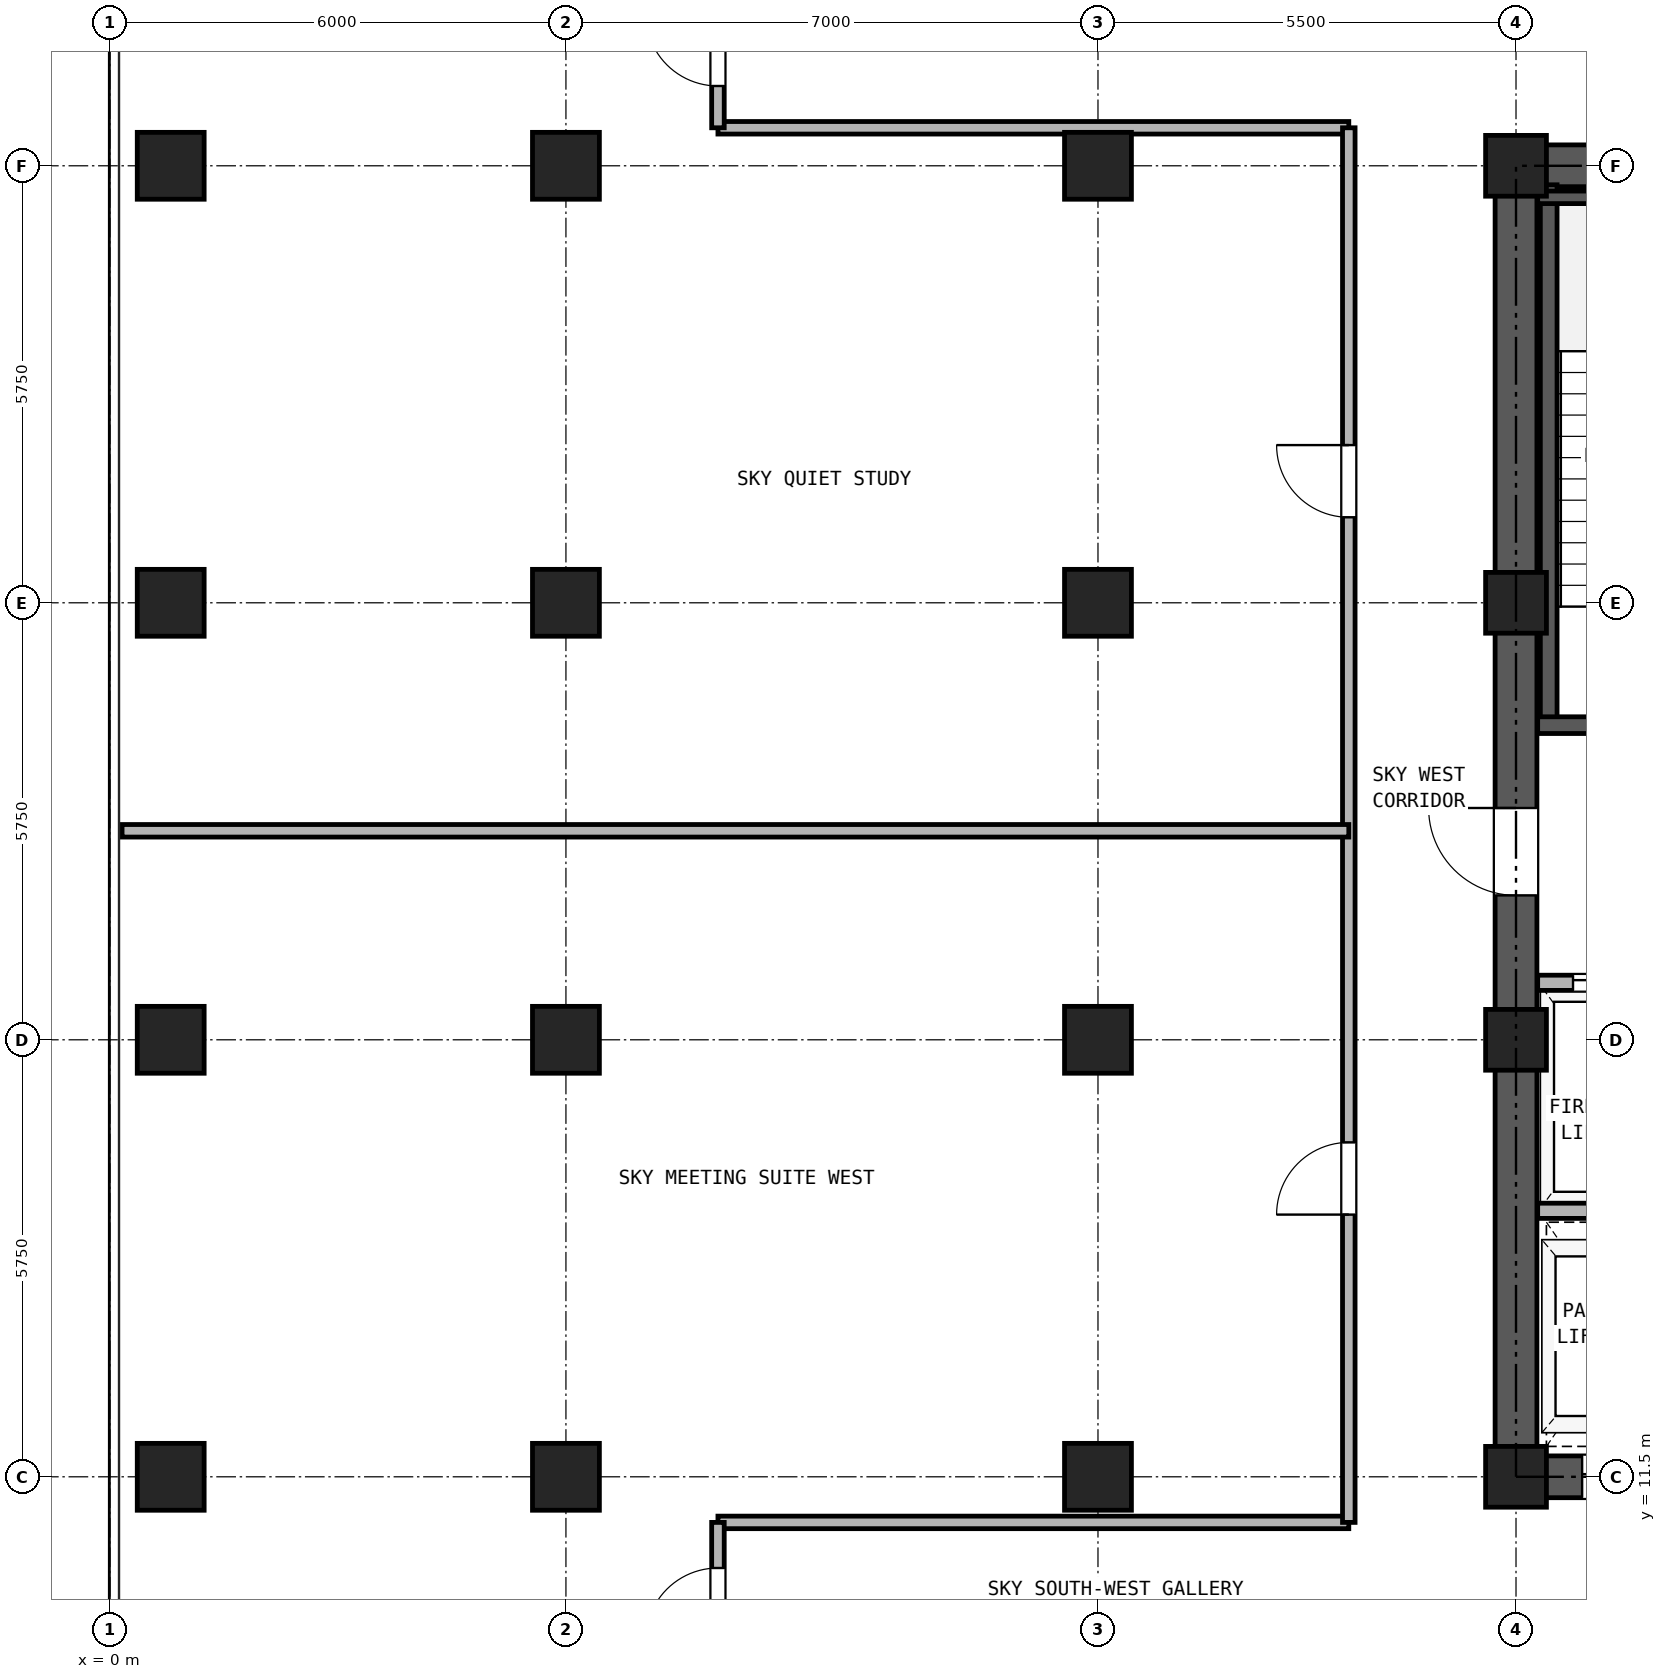
"""IFC4 building model, lengths in metres.
Left out: names, types, materials, properties, quantities, classifications, styles, units other than length and angle.
Written with IfcOpenShell. Run it as: python <this file> out.ifc"""

import sys

from ifc_helpers import new_model, si_unit, direction, frame, frame_2d, origin, origin_2d, place, context, subcontext, project, spatial, rectangle, hollow_rectangle, extrude, source, transform, mapped, element, fill, save


model = new_model("IFC4")
c1 = context("Model", 3, precision=1e-05, world=origin(), true_north=direction((0.0, 1.0)))
c2 = subcontext(c1, "Body", "Model", "MODEL_VIEW")
j1 = project(units=[si_unit("LENGTHUNIT", "METRE"), si_unit("PLANEANGLEUNIT", "RADIAN")], contexts=[c1])
p1 = place(None, origin())
s1 = spatial("IfcSite", under=j1, at=p1, CompositionType="ELEMENT")
p2 = place(p1, origin())
s2 = spatial("IfcBuilding", under=s1, at=p2, CompositionType="ELEMENT")
p3 = place(p2, frame((0.0, 0.0, 88.2)))
s3 = spatial("IfcBuildingStorey", under=s2, at=p3, CompositionType="ELEMENT", Elevation=88.2)
m1 = source(origin(), c2, "Body", "SweptSolid", [
    extrude(hollow_rectangle(XDim=0.88, YDim=0.88, WallThickness=0.05, at=origin_2d()), origin(), (0.0, 0.0, 1.0), 4.25),
])
for number, where, z_axis, x_axis in (
    (1, (0.8, 11.5, 0.0), (0.0, 0.0, 1.0), (1.0, 0.0, 0.0)),
    (2, (0.8, 17.25, 0.0), (0.0, 0.0, 1.0), (1.0, 0.0, 0.0)),
    (3, (0.8, 23.0, 0.0), (0.0, 0.0, 1.0), (1.0, 0.0, 0.0)),
    (4, (0.8, 28.75, 0.0), (0.0, 0.0, 1.0), (1.0, 0.0, 0.0)),
    (5, (6.0, 11.5, 0.0), (0.0, 0.0, 1.0), (1.0, 0.0, 0.0)),
    (6, (6.0, 17.25, 0.0), (0.0, 0.0, 1.0), (1.0, 0.0, 0.0)),
    (7, (6.0, 23.0, 0.0), (0.0, 0.0, 1.0), (1.0, 0.0, 0.0)),
    (8, (6.0, 28.75, 0.0), (0.0, 0.0, 1.0), (1.0, 0.0, 0.0)),
    (9, (13.0, 11.5, 0.0), (0.0, 0.0, 1.0), (1.0, 0.0, 0.0)),
    (10, (13.0, 17.25, 0.0), (0.0, 0.0, 1.0), (1.0, 0.0, 0.0)),
    (11, (13.0, 23.0, 0.0), (0.0, 0.0, 1.0), (1.0, 0.0, 0.0)),
    (12, (13.0, 28.75, 0.0), (0.0, 0.0, 1.0), (1.0, 0.0, 0.0)),
):
    element("IfcColumn", number, at=place(p3, frame(where, z_axis=z_axis, x_axis=x_axis)), inside=s3, PredefinedType="COLUMN", context=c2, shape_type="MappedRepresentation", body=[
        mapped(m1, transform((0.0, 0.0, 0.0), x_axis=(1.0, 0.0, 0.0), y_axis=(0.0, 1.0, 0.0), z_axis=(0.0, 0.0, 1.0), scale=1.0)),
    ])
m2 = source(origin(), c2, "Body", "SweptSolid", [
    extrude(hollow_rectangle(XDim=0.8, YDim=0.8, WallThickness=0.045, at=origin_2d()), origin(), (0.0, 0.0, 1.0), 4.25),
])
for number, where, z_axis, x_axis in (
    (13, (18.5, 11.5, 0.0), (0.0, 0.0, 1.0), (1.0, 0.0, 0.0)),
    (14, (18.5, 17.25, 0.0), (0.0, 0.0, 1.0), (1.0, 0.0, 0.0)),
    (15, (18.5, 23.0, 0.0), (0.0, 0.0, 1.0), (1.0, 0.0, 0.0)),
    (16, (18.5, 28.75, 0.0), (0.0, 0.0, 1.0), (1.0, 0.0, 0.0)),
):
    element("IfcColumn", number, at=place(p3, frame(where, z_axis=z_axis, x_axis=x_axis)), inside=s3, PredefinedType="COLUMN", context=c2, shape_type="MappedRepresentation", body=[
        mapped(m2, transform((0.0, 0.0, 0.0), x_axis=(1.0, 0.0, 0.0), y_axis=(0.0, 1.0, 0.0), z_axis=(0.0, 0.0, 1.0), scale=1.0)),
    ])
p4 = place(p3, frame((18.225, 11.5, 0.0), z_axis=(0.0, 0.0, 1.0), x_axis=(1.0, 0.0, 0.0)))
e17 = element("IfcWall", 17, at=p4, inside=s3, PredefinedType="SHEAR", context=c2, shape_type="SweptSolid", body=[
    extrude(rectangle(XDim=10.55, YDim=0.55, at=frame_2d((5.275, 0.0))), origin(), (0.0, 0.0, 1.0), 4.25),
])
p5 = place(p4, frame((1.145, 0.0, 0.0)))
e18 = element("IfcOpeningElement", 18, at=p5, cuts=e17, PredefinedType="OPENING", context=c2, shape_type="SweptSolid", body=[
    extrude(rectangle(XDim=1.1, YDim=2.25, at=frame_2d((0.55, 1.125))), frame((0.0, 0.285, 0.0), z_axis=(0.0, -1.0, 0.0), x_axis=(1.0, 0.0, 0.0)), (0.0, 0.0, 1.0), 0.57),
])
p6 = place(p4, frame((3.445, 0.0, 0.0)))
e19 = element("IfcOpeningElement", 19, at=p6, cuts=e17, PredefinedType="OPENING", context=c2, shape_type="SweptSolid", body=[
    extrude(rectangle(XDim=1.1, YDim=2.25, at=frame_2d((0.55, 1.125))), frame((0.0, 0.285, 0.0), z_axis=(0.0, -1.0, 0.0), x_axis=(1.0, 0.0, 0.0)), (0.0, 0.0, 1.0), 0.57),
])
p7 = place(p4, frame((5.875, 0.0, 0.0)))
e20 = element("IfcOpeningElement", 20, at=p7, cuts=e17, PredefinedType="OPENING", context=c2, shape_type="SweptSolid", body=[
    extrude(rectangle(XDim=1.1, YDim=2.25, at=frame_2d((0.55, 1.125))), frame((0.0, 0.285, 0.0), z_axis=(0.0, -1.0, 0.0), x_axis=(1.0, 0.0, 0.0)), (0.0, 0.0, 1.0), 0.57),
])
p8 = place(p4, frame((8.275, 0.0, 0.0)))
e21 = element("IfcOpeningElement", 21, at=p8, cuts=e17, PredefinedType="OPENING", context=c2, shape_type="SweptSolid", body=[
    extrude(rectangle(XDim=1.1, YDim=2.25, at=frame_2d((0.55, 1.125))), frame((0.0, 0.285, 0.0), z_axis=(0.0, -1.0, 0.0), x_axis=(1.0, 0.0, 0.0)), (0.0, 0.0, 1.0), 0.57),
])
p9 = place(p3, frame((18.225, 28.75, 0.0), z_axis=(0.0, 0.0, 1.0), x_axis=(1.0, 0.0, 0.0)))
e22 = element("IfcWall", 22, at=p9, inside=s3, PredefinedType="SHEAR", context=c2, shape_type="SweptSolid", body=[
    extrude(rectangle(XDim=10.55, YDim=0.55, at=frame_2d((5.275, 0.0))), origin(), (0.0, 0.0, 1.0), 4.25),
])
p10 = place(p9, frame((4.155, 0.0, 0.0)))
e23 = element("IfcOpeningElement", 23, at=p10, cuts=e22, PredefinedType="OPENING", context=c2, shape_type="SweptSolid", body=[
    extrude(rectangle(XDim=0.9, YDim=2.05, at=frame_2d((0.45, 1.025))), frame((0.0, 0.285, 0.0), z_axis=(0.0, -1.0, 0.0), x_axis=(1.0, 0.0, 0.0)), (0.0, 0.0, 1.0), 0.57),
])
p11 = place(p9, frame((5.695, 0.0, 0.0)))
e24 = element("IfcOpeningElement", 24, at=p11, cuts=e22, PredefinedType="OPENING", context=c2, shape_type="SweptSolid", body=[
    extrude(rectangle(XDim=0.9, YDim=2.05, at=frame_2d((0.45, 1.025))), frame((0.0, 0.285, 0.0), z_axis=(0.0, -1.0, 0.0), x_axis=(1.0, 0.0, 0.0)), (0.0, 0.0, 1.0), 0.57),
])
p12 = place(p3, frame((18.5, 11.775, 0.0), z_axis=(0.0, 0.0, 1.0), x_axis=(0.0, 1.0, 0.0)))
e25 = element("IfcWall", 25, at=p12, inside=s3, PredefinedType="SHEAR", context=c2, shape_type="SweptSolid", body=[
    extrude(rectangle(XDim=16.7, YDim=0.55, at=frame_2d((8.35, 0.0))), origin(), (0.0, 0.0, 1.0), 4.25),
])
p13 = place(p12, frame((7.375, 0.0, 0.0)))
e26 = element("IfcOpeningElement", 26, at=p13, cuts=e25, PredefinedType="OPENING", context=c2, shape_type="SweptSolid", body=[
    extrude(rectangle(XDim=1.15, YDim=2.2, at=frame_2d((0.575, 1.1))), frame((0.0, 0.285, 0.0), z_axis=(0.0, -1.0, 0.0), x_axis=(1.0, 0.0, 0.0)), (0.0, 0.0, 1.0), 0.57),
])
p14 = place(p3, frame((18.93, 21.39, 0.0), z_axis=(0.0, 0.0, 1.0), x_axis=(0.0, 1.0, 0.0)))
e27 = element("IfcWall", 27, at=p14, inside=s3, PredefinedType="SOLIDWALL", context=c2, shape_type="SweptSolid", body=[
    extrude(rectangle(XDim=7.11, YDim=0.22, at=frame_2d((3.555, 0.0))), origin(), (0.0, 0.0, 1.0), 4.25),
])
p15 = place(p3, frame((18.785, 28.335, 0.0), z_axis=(0.0, 0.0, 1.0), x_axis=(1.0, 0.0, 0.0)))
e28 = element("IfcWall", 28, at=p15, inside=s3, PredefinedType="PARTITIONING", context=c2, shape_type="SweptSolid", body=[
    extrude(rectangle(XDim=3.325, YDim=0.165, at=frame_2d((1.663, 0.0))), origin(), (0.0, 0.0, 1.0), 4.25),
])
p16 = place(p3, frame((18.785, 21.39, 0.0), z_axis=(0.0, 0.0, 1.0), x_axis=(1.0, 0.0, 0.0)))
e29 = element("IfcWall", 29, at=p16, inside=s3, PredefinedType="SOLIDWALL", context=c2, shape_type="SweptSolid", body=[
    extrude(rectangle(XDim=6.345, YDim=0.22, at=frame_2d((3.172, 0.0))), origin(), (0.0, 0.0, 1.0), 4.25),
])
p17 = place(p16, frame((1.065, 0.0, 0.0)))
e30 = element("IfcOpeningElement", 30, at=p17, cuts=e29, PredefinedType="OPENING", context=c2, shape_type="SweptSolid", body=[
    extrude(rectangle(XDim=1.15, YDim=2.2, at=frame_2d((0.575, 1.1))), frame((0.0, 0.12, 0.0), z_axis=(0.0, -1.0, 0.0), x_axis=(1.0, 0.0, 0.0)), (0.0, 0.0, 1.0), 0.24),
])
p18 = place(p16, frame((4.795, 0.0, 0.0)))
e31 = element("IfcOpeningElement", 31, at=p18, cuts=e29, PredefinedType="OPENING", context=c2, shape_type="SweptSolid", body=[
    extrude(rectangle(XDim=1.1, YDim=2.25, at=frame_2d((0.55, 1.125))), frame((0.0, 0.12, 0.0), z_axis=(0.0, -1.0, 0.0), x_axis=(1.0, 0.0, 0.0)), (0.0, 0.0, 1.0), 0.24),
])
p19 = place(p3, frame((18.785, 18.0, 0.0), z_axis=(0.0, 0.0, 1.0), x_axis=(1.0, 0.0, 0.0)))
e32 = element("IfcWall", 32, at=p19, inside=s3, PredefinedType="PARTITIONING", context=c2, shape_type="SweptSolid", body=[
    extrude(rectangle(XDim=9.43, YDim=0.2, at=frame_2d((4.715, 0.0))), origin(), (0.0, 0.0, 1.0), 4.25),
])
p20 = place(p19, frame((0.465, 0.0, 0.0)))
e33 = element("IfcOpeningElement", 33, at=p20, cuts=e32, PredefinedType="OPENING", context=c2, shape_type="SweptSolid", body=[
    extrude(rectangle(XDim=1.3, YDim=2.3, at=frame_2d((0.65, 1.15))), frame((0.0, 0.11, 0.0), z_axis=(0.0, -1.0, 0.0), x_axis=(1.0, 0.0, 0.0)), (0.0, 0.0, 1.0), 0.22),
])
p21 = place(p19, frame((2.565, 0.0, 0.0)))
e34 = element("IfcOpeningElement", 34, at=p21, cuts=e32, PredefinedType="OPENING", context=c2, shape_type="SweptSolid", body=[
    extrude(rectangle(XDim=1.3, YDim=2.3, at=frame_2d((0.65, 1.15))), frame((0.0, 0.11, 0.0), z_axis=(0.0, -1.0, 0.0), x_axis=(1.0, 0.0, 0.0)), (0.0, 0.0, 1.0), 0.22),
])
p22 = place(p19, frame((7.065, 0.0, 0.0)))
e35 = element("IfcOpeningElement", 35, at=p22, cuts=e32, PredefinedType="OPENING", context=c2, shape_type="SweptSolid", body=[
    extrude(rectangle(XDim=1.0, YDim=2.15, at=frame_2d((0.5, 1.075))), frame((0.0, 0.11, 0.0), z_axis=(0.0, -1.0, 0.0), x_axis=(1.0, 0.0, 0.0)), (0.0, 0.0, 1.0), 0.22),
])
p23 = place(p3, frame((18.785, 15.0, 0.0), z_axis=(0.0, 0.0, 1.0), x_axis=(1.0, 0.0, 0.0)))
e36 = element("IfcWall", 36, at=p23, inside=s3, PredefinedType="PARTITIONING", context=c2, shape_type="SweptSolid", body=[
    extrude(rectangle(XDim=9.43, YDim=0.2, at=frame_2d((4.715, 0.0))), origin(), (0.0, 0.0, 1.0), 4.25),
])
for number, where, z_axis, x_axis in (
    (37, (8.0, 10.9, 0.0), (0.0, 0.0, 1.0), (1.0, 0.0, 0.0)),
    (38, (8.0, 29.25, 0.0), (0.0, 0.0, 1.0), (1.0, 0.0, 0.0)),
):
    element("IfcWall", number, at=place(p3, frame(where, z_axis=z_axis, x_axis=x_axis)), inside=s3, PredefinedType="PARTITIONING", context=c2, shape_type="SweptSolid", body=[
        extrude(rectangle(XDim=8.3, YDim=0.165, at=frame_2d((4.15, 0.0))), origin(), (0.0, 0.0, 1.0), 4.25),
    ])
p24 = place(p3, frame((16.3, 10.9, 0.0), z_axis=(0.0, 0.0, 1.0), x_axis=(0.0, 1.0, 0.0)))
e39 = element("IfcWall", 39, at=p24, inside=s3, PredefinedType="PARTITIONING", context=c2, shape_type="SweptSolid", body=[
    extrude(rectangle(XDim=18.35, YDim=0.165, at=frame_2d((9.175, 0.0))), origin(), (0.0, 0.0, 1.0), 4.25),
])
p25 = place(p24, frame((4.05, 0.0, 0.0)))
e40 = element("IfcOpeningElement", 40, at=p25, cuts=e39, PredefinedType="OPENING", context=c2, shape_type="SweptSolid", body=[
    extrude(rectangle(XDim=0.95, YDim=2.15, at=frame_2d((0.475, 1.075))), frame((0.0, 0.093, 0.0), z_axis=(0.0, -1.0, 0.0), x_axis=(1.0, 0.0, 0.0)), (0.0, 0.0, 1.0), 0.185),
])
p26 = place(p24, frame((13.225, 0.0, 0.0)))
e41 = element("IfcOpeningElement", 41, at=p26, cuts=e39, PredefinedType="OPENING", context=c2, shape_type="SweptSolid", body=[
    extrude(rectangle(XDim=0.95, YDim=2.15, at=frame_2d((0.475, 1.075))), frame((0.0, 0.093, 0.0), z_axis=(0.0, -1.0, 0.0), x_axis=(1.0, 0.0, 0.0)), (0.0, 0.0, 1.0), 0.185),
])
p27 = place(p3, frame((8.0, 0.16, 0.0), z_axis=(0.0, 0.0, 1.0), x_axis=(0.0, 1.0, 0.0)))
e42 = element("IfcWall", 42, at=p27, inside=s3, PredefinedType="PARTITIONING", context=c2, shape_type="SweptSolid", body=[
    extrude(rectangle(XDim=10.74, YDim=0.165, at=frame_2d((5.37, 0.0))), origin(), (0.0, 0.0, 1.0), 4.25),
])
p28 = place(p27, frame((9.19, 0.0, 0.0)))
e43 = element("IfcOpeningElement", 43, at=p28, cuts=e42, PredefinedType="OPENING", context=c2, shape_type="SweptSolid", body=[
    extrude(rectangle(XDim=0.95, YDim=2.15, at=frame_2d((0.475, 1.075))), frame((0.0, 0.093, 0.0), z_axis=(0.0, -1.0, 0.0), x_axis=(1.0, 0.0, 0.0)), (0.0, 0.0, 1.0), 0.185),
])
p29 = place(p3, frame((8.0, 29.25, 0.0), z_axis=(0.0, 0.0, 1.0), x_axis=(0.0, 1.0, 0.0)))
e44 = element("IfcWall", 44, at=p29, inside=s3, PredefinedType="PARTITIONING", context=c2, shape_type="SweptSolid", body=[
    extrude(rectangle(XDim=5.89, YDim=0.165, at=frame_2d((2.945, 0.0))), origin(), (0.0, 0.0, 1.0), 4.25),
])
p30 = place(p29, frame((0.55, 0.0, 0.0)))
e45 = element("IfcOpeningElement", 45, at=p30, cuts=e44, PredefinedType="OPENING", context=c2, shape_type="SweptSolid", body=[
    extrude(rectangle(XDim=0.95, YDim=2.15, at=frame_2d((0.475, 1.075))), frame((0.0, 0.093, 0.0), z_axis=(0.0, -1.0, 0.0), x_axis=(1.0, 0.0, 0.0)), (0.0, 0.0, 1.0), 0.185),
])
p31 = place(p3, frame((0.16, 20.0, 0.0), z_axis=(0.0, 0.0, 1.0), x_axis=(1.0, 0.0, 0.0)))
e46 = element("IfcWall", 46, at=p31, inside=s3, PredefinedType="PARTITIONING", context=c2, shape_type="SweptSolid", body=[
    extrude(rectangle(XDim=16.14, YDim=0.165, at=frame_2d((8.07, 0.0))), origin(), (0.0, 0.0, 1.0), 3.883),
])
p32 = place(p20, origin())
e47 = element("IfcDoor", 47, at=p32, inside=s3, OperationType="DOUBLE_DOOR_SLIDING", PredefinedType="DOOR", context=c2, shape_type="SweptSolid", body=[
    extrude(rectangle(XDim=1.3, YDim=2.3, at=frame_2d((0.65, 1.15))), frame((0.0, 0.025, 0.0), z_axis=(0.0, -1.0, 0.0), x_axis=(1.0, 0.0, 0.0)), (0.0, 0.0, 1.0), 0.05),
])
fill(e33, e47)
p33 = place(p13, frame((1.15, 0.0, 0.0), z_axis=(0.0, 0.0, 1.0), x_axis=(-1.0, 0.0, 0.0)))
e48 = element("IfcDoor", 48, at=p33, inside=s3, OperationType="SINGLE_SWING_RIGHT", PredefinedType="DOOR", context=c2, shape_type="SweptSolid", body=[
    extrude(rectangle(XDim=1.15, YDim=2.2, at=frame_2d((0.575, 1.1))), frame((0.0, 0.025, 0.0), z_axis=(0.0, -1.0, 0.0), x_axis=(1.0, 0.0, 0.0)), (0.0, 0.0, 1.0), 0.05),
])
fill(e26, e48)
p34 = place(p5, frame((1.1, 0.0, 0.0), z_axis=(0.0, 0.0, 1.0), x_axis=(-1.0, 0.0, 0.0)))
e49 = element("IfcDoor", 49, at=p34, inside=s3, OperationType="DOUBLE_DOOR_SLIDING", PredefinedType="DOOR", context=c2, shape_type="SweptSolid", body=[
    extrude(rectangle(XDim=1.1, YDim=2.25, at=frame_2d((0.55, 1.125))), frame((0.0, 0.025, 0.0), z_axis=(0.0, -1.0, 0.0), x_axis=(1.0, 0.0, 0.0)), (0.0, 0.0, 1.0), 0.05),
])
fill(e18, e49)
p35 = place(p28, frame((0.95, 0.0, 0.0), z_axis=(0.0, 0.0, 1.0), x_axis=(-1.0, 0.0, 0.0)))
e50 = element("IfcDoor", 50, at=p35, inside=s3, OperationType="SINGLE_SWING_LEFT", PredefinedType="DOOR", context=c2, shape_type="SweptSolid", body=[
    extrude(rectangle(XDim=0.95, YDim=2.15, at=frame_2d((0.475, 1.075))), frame((0.0, 0.025, 0.0), z_axis=(0.0, -1.0, 0.0), x_axis=(1.0, 0.0, 0.0)), (0.0, 0.0, 1.0), 0.05),
])
fill(e43, e50)
p36 = place(p30, frame((0.95, 0.0, 0.0), z_axis=(0.0, 0.0, 1.0), x_axis=(-1.0, 0.0, 0.0)))
e51 = element("IfcDoor", 51, at=p36, inside=s3, OperationType="SINGLE_SWING_RIGHT", PredefinedType="DOOR", context=c2, shape_type="SweptSolid", body=[
    extrude(rectangle(XDim=0.95, YDim=2.15, at=frame_2d((0.475, 1.075))), frame((0.0, 0.025, 0.0), z_axis=(0.0, -1.0, 0.0), x_axis=(1.0, 0.0, 0.0)), (0.0, 0.0, 1.0), 0.05),
])
fill(e45, e51)
p37 = place(p25, frame((0.95, 0.0, 0.0), z_axis=(0.0, 0.0, 1.0), x_axis=(-1.0, 0.0, 0.0)))
e52 = element("IfcDoor", 52, at=p37, inside=s3, OperationType="SINGLE_SWING_LEFT", PredefinedType="DOOR", context=c2, shape_type="SweptSolid", body=[
    extrude(rectangle(XDim=0.95, YDim=2.15, at=frame_2d((0.475, 1.075))), frame((0.0, 0.025, 0.0), z_axis=(0.0, -1.0, 0.0), x_axis=(1.0, 0.0, 0.0)), (0.0, 0.0, 1.0), 0.05),
])
fill(e40, e52)
p38 = place(p26, frame((0.95, 0.0, 0.0), z_axis=(0.0, 0.0, 1.0), x_axis=(-1.0, 0.0, 0.0)))
e53 = element("IfcDoor", 53, at=p38, inside=s3, OperationType="SINGLE_SWING_RIGHT", PredefinedType="DOOR", context=c2, shape_type="SweptSolid", body=[
    extrude(rectangle(XDim=0.95, YDim=2.15, at=frame_2d((0.475, 1.075))), frame((0.0, 0.025, 0.0), z_axis=(0.0, -1.0, 0.0), x_axis=(1.0, 0.0, 0.0)), (0.0, 0.0, 1.0), 0.05),
])
fill(e41, e53)
save(model, sys.argv[1])
